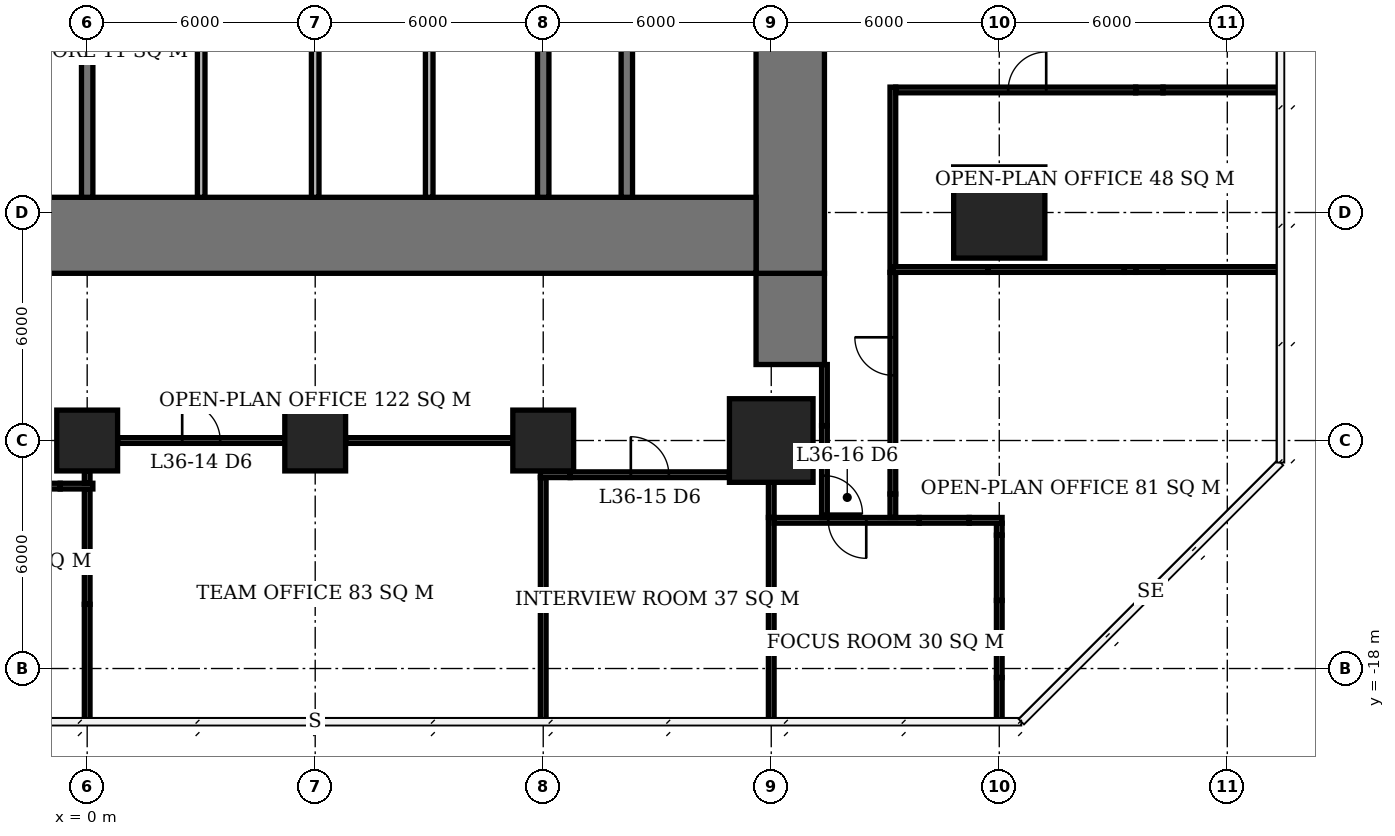
"""IFC4 building model, lengths in metres.
Left out: names, types, materials, properties, quantities, classifications, styles, units other than length and angle.
Written with IfcOpenShell. Run it as: python <this file> out.ifc"""

import sys

from ifc_helpers import new_model, si_unit, direction, frame, frame_2d, origin, origin_2d, place, context, subcontext, project, spatial, rectangle, extrude, element, fill, save


model = new_model("IFC4")
c1 = context("Model", 3, precision=1e-05, world=origin(), true_north=direction((0.0, 1.0)))
c2 = subcontext(c1, "Body", "Model", "MODEL_VIEW")
j1 = project(units=[si_unit("LENGTHUNIT", "METRE"), si_unit("PLANEANGLEUNIT", "RADIAN")], contexts=[c1])
p1 = place(None, origin())
s1 = spatial("IfcSite", under=j1, at=p1, CompositionType="ELEMENT")
p2 = place(p1, origin())
s2 = spatial("IfcBuilding", under=s1, at=p2, CompositionType="ELEMENT")
p3 = place(p2, frame((0.0, 0.0, 148.4)))
s3 = spatial("IfcBuildingStorey", under=s2, at=p3, CompositionType="ELEMENT", Elevation=148.4)
for number, where, z_axis, x_axis in (
    (1, (0.0, -12.0, 0.0), (0.0, 0.0, 1.0), (1.0, 0.0, 0.0)),
    (2, (6.0, -12.0, 0.0), (0.0, 0.0, 1.0), (1.0, 0.0, 0.0)),
    (3, (12.0, -12.0, 0.0), (0.0, 0.0, 1.0), (1.0, 0.0, 0.0)),
):
    element("IfcColumn", number, at=place(p3, frame(where, z_axis=z_axis, x_axis=x_axis)), inside=s3, PredefinedType="COLUMN", context=c2, shape_type="SweptSolid", body=[
        extrude(rectangle(XDim=1.6, YDim=1.6, at=origin_2d()), origin(), (0.0, 0.0, 1.0), 3.9),
    ])
p4 = place(p3, frame((18.0, -12.0, 0.0), z_axis=(0.0, 0.0, 1.0), x_axis=(1.0, 0.0, 0.0)))
e4 = element("IfcColumn", 4, at=p4, inside=s3, PredefinedType="COLUMN", context=c2, shape_type="SweptSolid", body=[
    extrude(rectangle(XDim=2.2, YDim=2.2, at=origin_2d()), origin(), (0.0, 0.0, 1.0), 3.9),
])
p5 = place(p3, frame((24.0, -6.0, 0.0), z_axis=(0.0, 0.0, 1.0), x_axis=(1.0, 0.0, 0.0)))
e5 = element("IfcColumn", 5, at=p5, inside=s3, PredefinedType="COLUMN", context=c2, shape_type="SweptSolid", body=[
    extrude(rectangle(XDim=2.4, YDim=2.4, at=origin_2d()), origin(), (0.0, 0.0, 1.0), 3.9),
])
p6 = place(p3, frame((-5.6, -6.6, 0.0), z_axis=(0.0, 0.0, 1.0), x_axis=(1.0, 0.0, 0.0)))
e6 = element("IfcWall", 6, at=p6, inside=s3, PredefinedType="SHEAR", context=c2, shape_type="SweptSolid", body=[
    extrude(rectangle(XDim=23.2, YDim=2.0, at=frame_2d((11.6, 0.0))), origin(), (0.0, 0.0, 1.0), 3.9),
])
p7 = place(p3, frame((18.5, -7.6, 0.0), z_axis=(0.0, 0.0, 1.0), x_axis=(0.0, 1.0, 0.0)))
e7 = element("IfcWall", 7, at=p7, inside=s3, PredefinedType="SHEAR", context=c2, shape_type="SweptSolid", body=[
    extrude(rectangle(XDim=21.2, YDim=1.8, at=frame_2d((10.6, 0.0))), origin(), (0.0, 0.0, 1.0), 3.9),
])
p8 = place(p7, frame((9.2, 0.0, 0.0)))
e8 = element("IfcOpeningElement", 8, at=p8, cuts=e7, PredefinedType="OPENING", context=c2, shape_type="SweptSolid", body=[
    extrude(rectangle(XDim=1.8, YDim=2.4, at=frame_2d((0.9, 1.2))), frame((0.0, 0.91, 0.0), z_axis=(0.0, -1.0, 0.0), x_axis=(1.0, 0.0, 0.0)), (0.0, 0.0, 1.0), 1.82),
])
p9 = place(p3, frame((18.5, -10.0, 0.0), z_axis=(0.0, 0.0, 1.0), x_axis=(0.0, 1.0, 0.0)))
e9 = element("IfcWall", 9, at=p9, inside=s3, PredefinedType="SHEAR", context=c2, shape_type="SweptSolid", body=[
    extrude(rectangle(XDim=2.4, YDim=1.8, at=frame_2d((1.2, 0.0))), origin(), (0.0, 0.0, 1.0), 3.9),
])
for number, where, z_axis, x_axis in (
    (10, (0.0, -5.6, 0.0), (0.0, 0.0, 1.0), (0.0, 1.0, 0.0)),
    (11, (12.0, -5.6, 0.0), (0.0, 0.0, 1.0), (0.0, 1.0, 0.0)),
):
    element("IfcWall", number, at=place(p3, frame(where, z_axis=z_axis, x_axis=x_axis)), inside=s3, PredefinedType="SHEAR", context=c2, shape_type="SweptSolid", body=[
        extrude(rectangle(XDim=5.45, YDim=0.3, at=frame_2d((2.725, 0.0))), origin(), (0.0, 0.0, 1.0), 3.9),
    ])
p10 = place(p3, frame((14.2, -5.6, 0.0), z_axis=(0.0, 0.0, 1.0), x_axis=(0.0, 1.0, 0.0)))
e12 = element("IfcWall", 12, at=p10, inside=s3, PredefinedType="SHEAR", context=c2, shape_type="SweptSolid", body=[
    extrude(rectangle(XDim=8.45, YDim=0.3, at=frame_2d((4.225, 0.0))), origin(), (0.0, 0.0, 1.0), 3.9),
])
for number, where, z_axis, x_axis in (
    (13, (3.0, -5.6, 0.0), (0.0, 0.0, 1.0), (0.0, 1.0, 0.0)),
    (14, (6.0, -5.6, 0.0), (0.0, 0.0, 1.0), (0.0, 1.0, 0.0)),
    (15, (9.0, -5.6, 0.0), (0.0, 0.0, 1.0), (0.0, 1.0, 0.0)),
):
    element("IfcWall", number, at=place(p3, frame(where, z_axis=z_axis, x_axis=x_axis)), inside=s3, PredefinedType="SOLIDWALL", context=c2, shape_type="SweptSolid", body=[
        extrude(rectangle(XDim=5.45, YDim=0.2, at=frame_2d((2.725, 0.0))), origin(), (0.0, 0.0, 1.0), 3.9),
    ])
p11 = place(p3, frame((21.892, -14.1, 0.0), z_axis=(0.0, 0.0, 1.0), x_axis=(-1.0, 0.0, 0.0)))
e16 = element("IfcWall", 16, at=p11, inside=s3, PredefinedType="PARTITIONING", context=c2, shape_type="SweptSolid", body=[
    extrude(rectangle(XDim=3.817, YDim=0.15, at=frame_2d((1.909, 0.0))), origin(), (0.0, 0.0, 1.0), 2.65),
])
p12 = place(p11, frame((1.392, 0.0, 0.0)))
e17 = element("IfcOpeningElement", 17, at=p12, cuts=e16, PredefinedType="OPENING", context=c2, shape_type="SweptSolid", body=[
    extrude(rectangle(XDim=1.0, YDim=2.1, at=frame_2d((0.5, 1.05))), frame((0.0, 0.085, 0.0), z_axis=(0.0, -1.0, 0.0), x_axis=(1.0, 0.0, 0.0)), (0.0, 0.0, 1.0), 0.17),
])
p13 = place(p3, frame((21.892, -14.1, 0.0), z_axis=(0.0, 0.0, 1.0), x_axis=(1.0, 0.0, 0.0)))
e18 = element("IfcWall", 18, at=p13, inside=s3, PredefinedType="PARTITIONING", context=c2, shape_type="SweptSolid", body=[
    extrude(rectangle(XDim=1.318, YDim=0.15, at=frame_2d((0.659, 0.0))), origin(), (0.0, 0.0, 1.0), 3.65),
])
p14 = place(p3, frame((23.21, -14.1, 0.0), z_axis=(0.0, 0.0, 1.0), x_axis=(1.0, 0.0, 0.0)))
e19 = element("IfcWall", 19, at=p14, inside=s3, PredefinedType="PARTITIONING", context=c2, shape_type="SweptSolid", body=[
    extrude(rectangle(XDim=0.865, YDim=0.15, at=frame_2d((0.433, 0.0))), origin(), (0.0, 0.0, 1.0), 2.65),
])
p15 = place(p3, frame((-5.29, -13.2, 0.0), z_axis=(0.0, 0.0, 1.0), x_axis=(1.0, 0.0, 0.0)))
e20 = element("IfcWall", 20, at=p15, inside=s3, PredefinedType="PARTITIONING", context=c2, shape_type="SweptSolid", body=[
    extrude(rectangle(XDim=4.58, YDim=0.15, at=frame_2d((2.29, 0.0))), origin(), (0.0, 0.0, 1.0), 3.65),
])
p16 = place(p15, frame((1.79, 0.0, 0.0)))
e21 = element("IfcOpeningElement", 21, at=p16, cuts=e20, PredefinedType="OPENING", context=c2, shape_type="SweptSolid", body=[
    extrude(rectangle(XDim=1.0, YDim=2.1, at=frame_2d((0.5, 1.05))), frame((0.0, 0.085, 0.0), z_axis=(0.0, -1.0, 0.0), x_axis=(1.0, 0.0, 0.0)), (0.0, 0.0, 1.0), 0.17),
])
p17 = place(p3, frame((-0.71, -13.2, 0.0), z_axis=(0.0, 0.0, 1.0), x_axis=(1.0, 0.0, 0.0)))
e22 = element("IfcWall", 22, at=p17, inside=s3, PredefinedType="PARTITIONING", context=c2, shape_type="SweptSolid", body=[
    extrude(rectangle(XDim=0.86, YDim=0.15, at=frame_2d((0.43, 0.0))), origin(), (0.0, 0.0, 1.0), 2.65),
])
p18 = place(p3, frame((11.925, -12.9, 0.0), z_axis=(0.0, 0.0, 1.0), x_axis=(1.0, 0.0, 0.0)))
e23 = element("IfcWall", 23, at=p18, inside=s3, PredefinedType="PARTITIONING", context=c2, shape_type="SweptSolid", body=[
    extrude(rectangle(XDim=0.785, YDim=0.15, at=frame_2d((0.393, 0.0))), origin(), (0.0, 0.0, 1.0), 2.65),
])
p19 = place(p3, frame((12.71, -12.9, 0.0), z_axis=(0.0, 0.0, 1.0), x_axis=(1.0, 0.0, 0.0)))
e24 = element("IfcWall", 24, at=p19, inside=s3, PredefinedType="PARTITIONING", context=c2, shape_type="SweptSolid", body=[
    extrude(rectangle(XDim=4.19, YDim=0.15, at=frame_2d((2.095, 0.0))), origin(), (0.0, 0.0, 1.0), 3.65),
])
p20 = place(p19, frame((1.595, 0.0, 0.0)))
e25 = element("IfcOpeningElement", 25, at=p20, cuts=e24, PredefinedType="OPENING", context=c2, shape_type="SweptSolid", body=[
    extrude(rectangle(XDim=1.0, YDim=2.1, at=frame_2d((0.5, 1.05))), frame((0.0, 0.085, 0.0), z_axis=(0.0, -1.0, 0.0), x_axis=(1.0, 0.0, 0.0)), (0.0, 0.0, 1.0), 0.17),
])
p21 = place(p3, frame((0.8, -12.0, 0.0), z_axis=(0.0, 0.0, 1.0), x_axis=(1.0, 0.0, 0.0)))
e26 = element("IfcWall", 26, at=p21, inside=s3, PredefinedType="PARTITIONING", context=c2, shape_type="SweptSolid", body=[
    extrude(rectangle(XDim=4.4, YDim=0.15, at=frame_2d((2.2, 0.0))), origin(), (0.0, 0.0, 1.0), 3.65),
])
p22 = place(p21, frame((1.7, 0.0, 0.0)))
e27 = element("IfcOpeningElement", 27, at=p22, cuts=e26, PredefinedType="OPENING", context=c2, shape_type="SweptSolid", body=[
    extrude(rectangle(XDim=1.0, YDim=2.1, at=frame_2d((0.5, 1.05))), frame((0.0, 0.085, 0.0), z_axis=(0.0, -1.0, 0.0), x_axis=(1.0, 0.0, 0.0)), (0.0, 0.0, 1.0), 0.17),
])
p23 = place(p3, frame((6.8, -12.0, 0.0), z_axis=(0.0, 0.0, 1.0), x_axis=(1.0, 0.0, 0.0)))
e28 = element("IfcWall", 28, at=p23, inside=s3, PredefinedType="PARTITIONING", context=c2, shape_type="SweptSolid", body=[
    extrude(rectangle(XDim=4.4, YDim=0.15, at=frame_2d((2.2, 0.0))), origin(), (0.0, 0.0, 1.0), 3.65),
])
p24 = place(p3, frame((0.0, -19.4, 0.0), z_axis=(0.0, 0.0, 1.0), x_axis=(0.0, 1.0, 0.0)))
e29 = element("IfcWall", 29, at=p24, inside=s3, PredefinedType="PARTITIONING", context=c2, shape_type="SweptSolid", body=[
    extrude(rectangle(XDim=3.09, YDim=0.15, at=frame_2d((1.545, 0.0))), origin(), (0.0, 0.0, 1.0), 3.65),
])
p25 = place(p3, frame((0.0, -16.31, 0.0), z_axis=(0.0, 0.0, 1.0), x_axis=(0.0, 1.0, 0.0)))
e30 = element("IfcWall", 30, at=p25, inside=s3, PredefinedType="PARTITIONING", context=c2, shape_type="SweptSolid", body=[
    extrude(rectangle(XDim=3.035, YDim=0.15, at=frame_2d((1.518, 0.0))), origin(), (0.0, 0.0, 1.0), 2.65),
])
p26 = place(p3, frame((0.0, -13.125, 0.0), z_axis=(0.0, 0.0, 1.0), x_axis=(0.0, 1.0, 0.0)))
e31 = element("IfcWall", 31, at=p26, inside=s3, PredefinedType="PARTITIONING", context=c2, shape_type="SweptSolid", body=[
    extrude(rectangle(XDim=0.325, YDim=0.15, at=frame_2d((0.163, 0.0))), origin(), (0.0, 0.0, 1.0), 2.65),
])
p27 = place(p3, frame((12.0, -19.4, 0.0), z_axis=(0.0, 0.0, 1.0), x_axis=(0.0, 1.0, 0.0)))
e32 = element("IfcWall", 32, at=p27, inside=s3, PredefinedType="PARTITIONING", context=c2, shape_type="SweptSolid", body=[
    extrude(rectangle(XDim=3.09, YDim=0.15, at=frame_2d((1.545, 0.0))), origin(), (0.0, 0.0, 1.0), 3.65),
])
p28 = place(p3, frame((12.0, -16.31, 0.0), z_axis=(0.0, 0.0, 1.0), x_axis=(0.0, 1.0, 0.0)))
e33 = element("IfcWall", 33, at=p28, inside=s3, PredefinedType="PARTITIONING", context=c2, shape_type="SweptSolid", body=[
    extrude(rectangle(XDim=3.335, YDim=0.15, at=frame_2d((1.667, 0.0))), origin(), (0.0, 0.0, 1.0), 2.65),
])
p29 = place(p3, frame((18.0, -19.4, 0.0), z_axis=(0.0, 0.0, 1.0), x_axis=(0.0, 1.0, 0.0)))
e34 = element("IfcWall", 34, at=p29, inside=s3, PredefinedType="PARTITIONING", context=c2, shape_type="SweptSolid", body=[
    extrude(rectangle(XDim=3.09, YDim=0.15, at=frame_2d((1.545, 0.0))), origin(), (0.0, 0.0, 1.0), 3.65),
])
p30 = place(p3, frame((18.0, -16.31, 0.0), z_axis=(0.0, 0.0, 1.0), x_axis=(0.0, 1.0, 0.0)))
e35 = element("IfcWall", 35, at=p30, inside=s3, PredefinedType="PARTITIONING", context=c2, shape_type="SweptSolid", body=[
    extrude(rectangle(XDim=2.285, YDim=0.15, at=frame_2d((1.143, 0.0))), origin(), (0.0, 0.0, 1.0), 2.65),
])
p31 = place(p3, frame((18.0, -14.025, 0.0), z_axis=(0.0, 0.0, 1.0), x_axis=(0.0, 1.0, 0.0)))
e36 = element("IfcWall", 36, at=p31, inside=s3, PredefinedType="PARTITIONING", context=c2, shape_type="SweptSolid", body=[
    extrude(rectangle(XDim=0.925, YDim=0.15, at=frame_2d((0.462, 0.0))), origin(), (0.0, 0.0, 1.0), 2.65),
])
p32 = place(p3, frame((24.0, -19.4, 0.0), z_axis=(0.0, 0.0, 1.0), x_axis=(0.0, 1.0, 0.0)))
e37 = element("IfcWall", 37, at=p32, inside=s3, PredefinedType="PARTITIONING", context=c2, shape_type="SweptSolid", body=[
    extrude(rectangle(XDim=1.163, YDim=0.15, at=frame_2d((0.582, 0.0))), origin(), (0.0, 0.0, 1.0), 3.65),
])
p33 = place(p3, frame((24.0, -18.237, 0.0), z_axis=(0.0, 0.0, 1.0), x_axis=(0.0, 1.0, 0.0)))
e38 = element("IfcWall", 38, at=p33, inside=s3, PredefinedType="PARTITIONING", context=c2, shape_type="SweptSolid", body=[
    extrude(rectangle(XDim=2.029, YDim=0.15, at=frame_2d((1.015, 0.0))), origin(), (0.0, 0.0, 1.0), 2.65),
])
p34 = place(p3, frame((24.0, -16.208, 0.0), z_axis=(0.0, 0.0, 1.0), x_axis=(0.0, 1.0, 0.0)))
e39 = element("IfcWall", 39, at=p34, inside=s3, PredefinedType="PARTITIONING", context=c2, shape_type="SweptSolid", body=[
    extrude(rectangle(XDim=1.718, YDim=0.15, at=frame_2d((0.859, 0.0))), origin(), (0.0, 0.0, 1.0), 3.65),
])
p35 = place(p3, frame((24.0, -14.49, 0.0), z_axis=(0.0, 0.0, 1.0), x_axis=(0.0, 1.0, 0.0)))
e40 = element("IfcWall", 40, at=p35, inside=s3, PredefinedType="PARTITIONING", context=c2, shape_type="SweptSolid", body=[
    extrude(rectangle(XDim=0.315, YDim=0.15, at=frame_2d((0.157, 0.0))), origin(), (0.0, 0.0, 1.0), 2.65),
])
p36 = place(p3, frame((19.4, -11.608, 0.0), z_axis=(0.0, 0.0, 1.0), x_axis=(0.0, -1.0, 0.0)))
e41 = element("IfcWall", 41, at=p36, inside=s3, PredefinedType="PARTITIONING", context=c2, shape_type="SweptSolid", body=[
    extrude(rectangle(XDim=2.417, YDim=0.15, at=frame_2d((1.208, 0.0))), origin(), (0.0, 0.0, 1.0), 2.65),
])
p37 = place(p36, frame((1.317, 0.0, 0.0)))
e42 = element("IfcOpeningElement", 42, at=p37, cuts=e41, PredefinedType="OPENING", context=c2, shape_type="SweptSolid", body=[
    extrude(rectangle(XDim=1.0, YDim=2.1, at=frame_2d((0.5, 1.05))), frame((0.0, 0.085, 0.0), z_axis=(0.0, -1.0, 0.0), x_axis=(1.0, 0.0, 0.0)), (0.0, 0.0, 1.0), 0.17),
])
p38 = place(p3, frame((19.4, -11.608, 0.0), z_axis=(0.0, 0.0, 1.0), x_axis=(0.0, 1.0, 0.0)))
e43 = element("IfcWall", 43, at=p38, inside=s3, PredefinedType="PARTITIONING", context=c2, shape_type="SweptSolid", body=[
    extrude(rectangle(XDim=1.608, YDim=0.15, at=frame_2d((0.804, 0.0))), origin(), (0.0, 0.0, 1.0), 3.65),
])
p39 = place(p3, frame((21.2, -14.025, 0.0), z_axis=(0.0, 0.0, 1.0), x_axis=(0.0, 1.0, 0.0)))
e44 = element("IfcWall", 44, at=p39, inside=s3, PredefinedType="PARTITIONING", context=c2, shape_type="SweptSolid", body=[
    extrude(rectangle(XDim=0.617, YDim=0.15, at=frame_2d((0.309, 0.0))), origin(), (0.0, 0.0, 1.0), 2.65),
])
p40 = place(p3, frame((21.2, -13.408, 0.0), z_axis=(0.0, 0.0, 1.0), x_axis=(0.0, 1.0, 0.0)))
e45 = element("IfcWall", 45, at=p40, inside=s3, PredefinedType="PARTITIONING", context=c2, shape_type="SweptSolid", body=[
    extrude(rectangle(XDim=5.833, YDim=0.15, at=frame_2d((2.917, 0.0))), origin(), (0.0, 0.0, 1.0), 3.65),
])
p41 = place(p40, frame((3.124, 0.0, 0.0)))
e46 = element("IfcOpeningElement", 46, at=p41, cuts=e45, PredefinedType="OPENING", context=c2, shape_type="SweptSolid", body=[
    extrude(rectangle(XDim=1.0, YDim=2.1, at=frame_2d((0.5, 1.05))), frame((0.0, 0.085, 0.0), z_axis=(0.0, -1.0, 0.0), x_axis=(1.0, 0.0, 0.0)), (0.0, 0.0, 1.0), 0.17),
])
p42 = place(p3, frame((21.2, -7.575, 0.0), z_axis=(0.0, 0.0, 1.0), x_axis=(0.0, 1.0, 0.0)))
e47 = element("IfcWall", 47, at=p42, inside=s3, PredefinedType="PARTITIONING", context=c2, shape_type="SweptSolid", body=[
    extrude(rectangle(XDim=4.875, YDim=0.15, at=frame_2d((2.438, 0.0))), origin(), (0.0, 0.0, 1.0), 3.65),
])
p43 = place(p3, frame((21.2, -7.5, 0.0), z_axis=(0.0, 0.0, 1.0), x_axis=(1.0, 0.0, 0.0)))
e48 = element("IfcWall", 48, at=p43, inside=s3, PredefinedType="PARTITIONING", context=c2, shape_type="SweptSolid", body=[
    extrude(rectangle(XDim=2.508, YDim=0.15, at=frame_2d((1.254, 0.0))), origin(), (0.0, 0.0, 1.0), 3.65),
])
p44 = place(p3, frame((23.708, -7.5, 0.0), z_axis=(0.0, 0.0, 1.0), x_axis=(1.0, 0.0, 0.0)))
e49 = element("IfcWall", 49, at=p44, inside=s3, PredefinedType="PARTITIONING", context=c2, shape_type="SweptSolid", body=[
    extrude(rectangle(XDim=3.584, YDim=0.15, at=frame_2d((1.792, 0.0))), origin(), (0.0, 0.0, 1.0), 2.65),
])
p45 = place(p3, frame((27.292, -7.5, 0.0), z_axis=(0.0, 0.0, 1.0), x_axis=(1.0, 0.0, 0.0)))
e50 = element("IfcWall", 50, at=p45, inside=s3, PredefinedType="PARTITIONING", context=c2, shape_type="SweptSolid", body=[
    extrude(rectangle(XDim=0.298, YDim=0.15, at=frame_2d((0.149, 0.0))), origin(), (0.0, 0.0, 1.0), 3.65),
])
p46 = place(p3, frame((27.59, -7.5, 0.0), z_axis=(0.0, 0.0, 1.0), x_axis=(1.0, 0.0, 0.0)))
e51 = element("IfcWall", 51, at=p46, inside=s3, PredefinedType="PARTITIONING", context=c2, shape_type="SweptSolid", body=[
    extrude(rectangle(XDim=0.72, YDim=0.15, at=frame_2d((0.36, 0.0))), origin(), (0.0, 0.0, 1.0), 2.65),
])
p47 = place(p3, frame((28.31, -7.5, 0.0), z_axis=(0.0, 0.0, 1.0), x_axis=(1.0, 0.0, 0.0)))
e52 = element("IfcWall", 52, at=p47, inside=s3, PredefinedType="PARTITIONING", context=c2, shape_type="SweptSolid", body=[
    extrude(rectangle(XDim=3.09, YDim=0.15, at=frame_2d((1.545, 0.0))), origin(), (0.0, 0.0, 1.0), 3.65),
])
p48 = place(p3, frame((21.275, -2.775, 0.0), z_axis=(0.0, 0.0, 1.0), x_axis=(1.0, 0.0, 0.0)))
e53 = element("IfcWall", 53, at=p48, inside=s3, PredefinedType="PARTITIONING", context=c2, shape_type="SweptSolid", body=[
    extrude(rectangle(XDim=6.315, YDim=0.15, at=frame_2d((3.158, 0.0))), origin(), (0.0, 0.0, 1.0), 3.65),
])
p49 = place(p48, frame((2.96, 0.0, 0.0)))
e54 = element("IfcOpeningElement", 54, at=p49, cuts=e53, PredefinedType="OPENING", context=c2, shape_type="SweptSolid", body=[
    extrude(rectangle(XDim=1.0, YDim=2.1, at=frame_2d((0.5, 1.05))), frame((0.0, 0.085, 0.0), z_axis=(0.0, -1.0, 0.0), x_axis=(1.0, 0.0, 0.0)), (0.0, 0.0, 1.0), 0.17),
])
p50 = place(p3, frame((27.59, -2.775, 0.0), z_axis=(0.0, 0.0, 1.0), x_axis=(1.0, 0.0, 0.0)))
e55 = element("IfcWall", 55, at=p50, inside=s3, PredefinedType="PARTITIONING", context=c2, shape_type="SweptSolid", body=[
    extrude(rectangle(XDim=0.72, YDim=0.15, at=frame_2d((0.36, 0.0))), origin(), (0.0, 0.0, 1.0), 2.65),
])
p51 = place(p3, frame((28.31, -2.775, 0.0), z_axis=(0.0, 0.0, 1.0), x_axis=(1.0, 0.0, 0.0)))
e56 = element("IfcWall", 56, at=p51, inside=s3, PredefinedType="PARTITIONING", context=c2, shape_type="SweptSolid", body=[
    extrude(rectangle(XDim=3.09, YDim=0.15, at=frame_2d((1.545, 0.0))), origin(), (0.0, 0.0, 1.0), 3.65),
])
p52 = place(p22, origin())
e57 = element("IfcDoor", 57, at=p52, inside=s3, OperationType="SINGLE_SWING_LEFT", PredefinedType="DOOR", context=c2, shape_type="SweptSolid", body=[
    extrude(rectangle(XDim=1.0, YDim=2.1, at=frame_2d((0.5, 1.05))), frame((0.0, 0.025, 0.0), z_axis=(0.0, -1.0, 0.0), x_axis=(1.0, 0.0, 0.0)), (0.0, 0.0, 1.0), 0.05),
])
fill(e27, e57)
p53 = place(p20, origin())
e58 = element("IfcDoor", 58, at=p53, inside=s3, OperationType="SINGLE_SWING_LEFT", PredefinedType="DOOR", context=c2, shape_type="SweptSolid", body=[
    extrude(rectangle(XDim=1.0, YDim=2.1, at=frame_2d((0.5, 1.05))), frame((0.0, 0.025, 0.0), z_axis=(0.0, -1.0, 0.0), x_axis=(1.0, 0.0, 0.0)), (0.0, 0.0, 1.0), 0.05),
])
fill(e25, e58)
p54 = place(p12, origin())
e59 = element("IfcDoor", 59, at=p54, inside=s3, OperationType="SINGLE_SWING_LEFT", PredefinedType="DOOR", context=c2, shape_type="SweptSolid", body=[
    extrude(rectangle(XDim=1.0, YDim=2.1, at=frame_2d((0.5, 1.05))), frame((0.0, 0.025, 0.0), z_axis=(0.0, -1.0, 0.0), x_axis=(1.0, 0.0, 0.0)), (0.0, 0.0, 1.0), 0.05),
])
fill(e17, e59)
p55 = place(p41, origin())
e60 = element("IfcDoor", 60, at=p55, inside=s3, OperationType="SINGLE_SWING_RIGHT", PredefinedType="DOOR", context=c2, shape_type="SweptSolid", body=[
    extrude(rectangle(XDim=1.0, YDim=2.1, at=frame_2d((0.5, 1.05))), frame((0.0, 0.025, 0.0), z_axis=(0.0, -1.0, 0.0), x_axis=(1.0, 0.0, 0.0)), (0.0, 0.0, 1.0), 0.05),
])
fill(e46, e60)
p56 = place(p49, origin())
e61 = element("IfcDoor", 61, at=p56, inside=s3, OperationType="SINGLE_SWING_RIGHT", PredefinedType="DOOR", context=c2, shape_type="SweptSolid", body=[
    extrude(rectangle(XDim=1.0, YDim=2.1, at=frame_2d((0.5, 1.05))), frame((0.0, 0.025, 0.0), z_axis=(0.0, -1.0, 0.0), x_axis=(1.0, 0.0, 0.0)), (0.0, 0.0, 1.0), 0.05),
])
fill(e54, e61)
p57 = place(p37, origin())
e62 = element("IfcDoor", 62, at=p57, inside=s3, OperationType="SINGLE_SWING_RIGHT", PredefinedType="DOOR", context=c2, shape_type="SweptSolid", body=[
    extrude(rectangle(XDim=1.0, YDim=2.1, at=frame_2d((0.5, 1.05))), frame((0.0, 0.025, 0.0), z_axis=(0.0, -1.0, 0.0), x_axis=(1.0, 0.0, 0.0)), (0.0, 0.0, 1.0), 0.05),
])
fill(e42, e62)
save(model, sys.argv[1])
